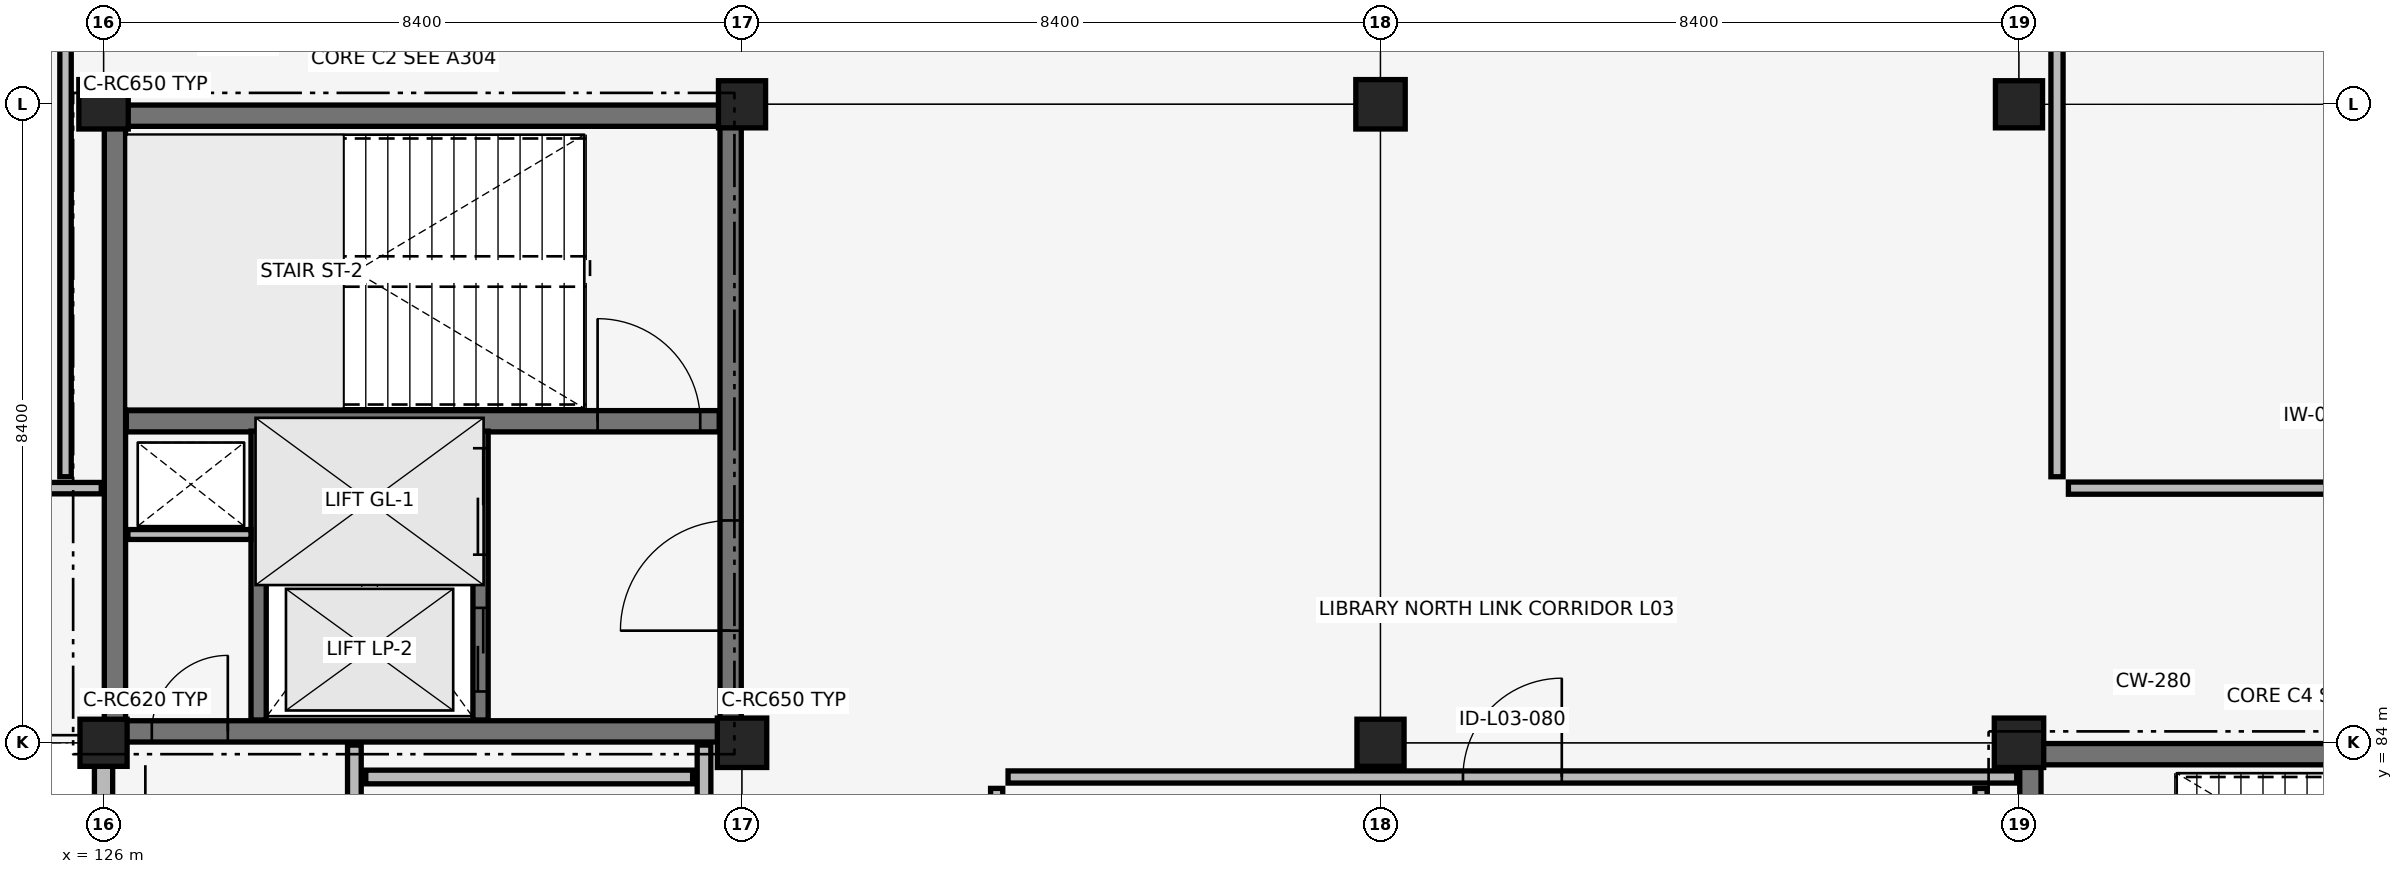
"""IFC4 building model, lengths in metres.
Left out: names, types, materials, properties, quantities, classifications, styles, units other than length and angle.
Written with IfcOpenShell. Run it as: python <this file> out.ifc"""

import sys

from ifc_helpers import new_model, si_unit, direction, frame, frame_2d, origin, origin_2d, place, context, subcontext, project, spatial, rectangle, extrude, element, fill, save


model = new_model("IFC4")
c1 = context("Model", 3, precision=1e-05, world=origin(), true_north=direction((0.0, 1.0)))
c2 = subcontext(c1, "Body", "Model", "MODEL_VIEW")
j1 = project(units=[si_unit("LENGTHUNIT", "METRE"), si_unit("PLANEANGLEUNIT", "RADIAN")], contexts=[c1])
p1 = place(None, origin())
s1 = spatial("IfcSite", under=j1, at=p1, CompositionType="ELEMENT")
p2 = place(p1, origin())
s2 = spatial("IfcBuilding", under=s1, at=p2, CompositionType="ELEMENT")
p3 = place(p2, frame((0.0, 0.0, 13.94)))
s3 = spatial("IfcBuildingStorey", under=s2, at=p3, CompositionType="ELEMENT", Elevation=13.94)
p4 = place(p3, frame((126.15, 84.15, 0.0), z_axis=(0.0, 0.0, 1.0), x_axis=(1.0, 0.0, 0.0)))
e1 = element("IfcWall", 1, at=p4, inside=s3, PredefinedType="SHEAR", context=c2, shape_type="SweptSolid", body=[
    extrude(rectangle(XDim=8.1, YDim=0.28, at=frame_2d((4.05, 0.0))), origin(), (0.0, 0.0, 1.0), 3.78),
])
p5 = place(p4, frame((0.485, 0.0, 0.0)))
e2 = element("IfcOpeningElement", 2, at=p5, cuts=e1, PredefinedType="OPENING", context=c2, shape_type="SweptSolid", body=[
    extrude(rectangle(XDim=1.0, YDim=2.15, at=frame_2d((0.5, 1.075))), frame((0.0, 0.15, 0.0), z_axis=(0.0, -1.0, 0.0), x_axis=(1.0, 0.0, 0.0)), (0.0, 0.0, 1.0), 0.3),
])
for number, where, z_axis, x_axis in (
    (3, (126.15, 92.25, 0.0), (0.0, 0.0, 1.0), (1.0, 0.0, 0.0)),
    (4, (126.15, 84.15, 0.0), (0.0, 0.0, 1.0), (0.0, 1.0, 0.0)),
):
    element("IfcWall", number, at=place(p3, frame(where, z_axis=z_axis, x_axis=x_axis)), inside=s3, PredefinedType="SHEAR", context=c2, shape_type="SweptSolid", body=[
        extrude(rectangle(XDim=8.1, YDim=0.28, at=frame_2d((4.05, 0.0))), origin(), (0.0, 0.0, 1.0), 3.78),
    ])
p6 = place(p3, frame((134.25, 84.15, 0.0), z_axis=(0.0, 0.0, 1.0), x_axis=(0.0, 1.0, 0.0)))
e5 = element("IfcWall", 5, at=p6, inside=s3, PredefinedType="SHEAR", context=c2, shape_type="SweptSolid", body=[
    extrude(rectangle(XDim=8.1, YDim=0.28, at=frame_2d((4.05, 0.0))), origin(), (0.0, 0.0, 1.0), 3.78),
])
p7 = place(p6, frame((1.325, 0.0, 0.0)))
e6 = element("IfcOpeningElement", 6, at=p7, cuts=e5, PredefinedType="OPENING", context=c2, shape_type="SweptSolid", body=[
    extrude(rectangle(XDim=1.45, YDim=2.15, at=frame_2d((0.725, 1.075))), frame((0.0, 0.15, 0.0), z_axis=(0.0, -1.0, 0.0), x_axis=(1.0, 0.0, 0.0)), (0.0, 0.0, 1.0), 0.3),
])
p8 = place(p3, frame((126.3, 88.23, 0.0), z_axis=(0.0, 0.0, 1.0), x_axis=(1.0, 0.0, 0.0)))
e7 = element("IfcWall", 7, at=p8, inside=s3, PredefinedType="SHEAR", context=c2, shape_type="SweptSolid", body=[
    extrude(rectangle(XDim=7.8, YDim=0.28, at=frame_2d((3.9, 0.0))), origin(), (0.0, 0.0, 1.0), 3.78),
])
p9 = place(p8, frame((6.2, 0.0, 0.0)))
e8 = element("IfcOpeningElement", 8, at=p9, cuts=e7, PredefinedType="OPENING", context=c2, shape_type="SweptSolid", body=[
    extrude(rectangle(XDim=1.35, YDim=2.15, at=frame_2d((0.675, 1.075))), frame((0.0, 0.15, 0.0), z_axis=(0.0, -1.0, 0.0), x_axis=(1.0, 0.0, 0.0)), (0.0, 0.0, 1.0), 0.3),
])
p10 = place(p3, frame((151.35, 83.85, 0.0), z_axis=(0.0, 0.0, 1.0), x_axis=(1.0, 0.0, 0.0)))
e9 = element("IfcWall", 9, at=p10, inside=s3, PredefinedType="SHEAR", context=c2, shape_type="SweptSolid", body=[
    extrude(rectangle(XDim=8.1, YDim=0.28, at=frame_2d((4.05, 0.0))), origin(), (0.0, 0.0, 1.0), 3.78),
])
p11 = place(p3, frame((151.35, 75.75, 0.0), z_axis=(0.0, 0.0, 1.0), x_axis=(0.0, 1.0, 0.0)))
e10 = element("IfcWall", 10, at=p11, inside=s3, PredefinedType="SHEAR", context=c2, shape_type="SweptSolid", body=[
    extrude(rectangle(XDim=8.1, YDim=0.28, at=frame_2d((4.05, 0.0))), origin(), (0.0, 0.0, 1.0), 3.78),
])
p12 = place(p11, frame((1.325, 0.0, 0.0)))
e11 = element("IfcOpeningElement", 11, at=p12, cuts=e10, PredefinedType="OPENING", context=c2, shape_type="SweptSolid", body=[
    extrude(rectangle(XDim=1.45, YDim=2.15, at=frame_2d((0.725, 1.075))), frame((0.0, 0.15, 0.0), z_axis=(0.0, -1.0, 0.0), x_axis=(1.0, 0.0, 0.0)), (0.0, 0.0, 1.0), 0.3),
])
p13 = place(p3, frame((126.0, 84.0, 0.0), z_axis=(0.0, 0.0, 1.0), x_axis=(1.0, 0.0, 0.0)))
e12 = element("IfcColumn", 12, at=p13, inside=s3, PredefinedType="COLUMN", context=c2, shape_type="SweptSolid", body=[
    extrude(rectangle(XDim=0.62, YDim=0.62, at=origin_2d()), origin(), (0.0, 0.0, 1.0), 3.78),
])
for number, where, z_axis, x_axis in (
    (13, (126.0, 92.4, 0.0), (0.0, 0.0, 1.0), (1.0, 0.0, 0.0)),
    (14, (134.4, 84.0, 0.0), (0.0, 0.0, 1.0), (1.0, 0.0, 0.0)),
):
    element("IfcColumn", number, at=place(p3, frame(where, z_axis=z_axis, x_axis=x_axis)), inside=s3, PredefinedType="COLUMN", context=c2, shape_type="SweptSolid", body=[
        extrude(rectangle(XDim=0.65, YDim=0.65, at=origin_2d()), origin(), (0.0, 0.0, 1.0), 3.78),
    ])
for number, where, z_axis, x_axis in (
    (15, (134.4, 92.4, 0.0), (0.0, 0.0, 1.0), (1.0, 0.0, 0.0)),
    (16, (142.8, 84.0, 0.0), (0.0, 0.0, 1.0), (1.0, 0.0, 0.0)),
):
    element("IfcColumn", number, at=place(p3, frame(where, z_axis=z_axis, x_axis=x_axis)), inside=s3, PredefinedType="COLUMN", context=c2, shape_type="SweptSolid", body=[
        extrude(rectangle(XDim=0.62, YDim=0.62, at=origin_2d()), origin(), (0.0, 0.0, 1.0), 3.78),
    ])
for number, where, z_axis, x_axis in (
    (17, (142.8, 92.4, 0.0), (0.0, 0.0, 1.0), (1.0, 0.0, 0.0)),
    (18, (151.2, 84.0, 0.0), (0.0, 0.0, 1.0), (1.0, 0.0, 0.0)),
):
    element("IfcColumn", number, at=place(p3, frame(where, z_axis=z_axis, x_axis=x_axis)), inside=s3, PredefinedType="COLUMN", context=c2, shape_type="SweptSolid", body=[
        extrude(rectangle(XDim=0.65, YDim=0.65, at=origin_2d()), origin(), (0.0, 0.0, 1.0), 3.78),
    ])
p14 = place(p3, frame((151.2, 92.4, 0.0), z_axis=(0.0, 0.0, 1.0), x_axis=(1.0, 0.0, 0.0)))
e19 = element("IfcColumn", 19, at=p14, inside=s3, PredefinedType="COLUMN", context=c2, shape_type="SweptSolid", body=[
    extrude(rectangle(XDim=0.62, YDim=0.62, at=origin_2d()), origin(), (0.0, 0.0, 1.0), 3.78),
])
p15 = place(p3, frame((126.0, 75.91, 0.0), z_axis=(0.0, 0.0, 1.0), x_axis=(0.0, 1.0, 0.0)))
e20 = element("IfcWall", 20, at=p15, inside=s3, PredefinedType="SOLIDWALL", context=c2, shape_type="SweptSolid", body=[
    extrude(rectangle(XDim=7.795, YDim=0.24, at=frame_2d((3.897, 0.0))), origin(), (0.0, 0.0, 1.0), 3.15),
])
p16 = place(p15, frame((0.8, 0.0, 0.35)))
e21 = element("IfcOpeningElement", 21, at=p16, cuts=e20, PredefinedType="OPENING", context=c2, shape_type="SweptSolid", body=[
    extrude(rectangle(XDim=0.44, YDim=1.25, at=frame_2d((0.22, 0.625))), frame((0.0, 0.13, 0.0), z_axis=(0.0, -1.0, 0.0), x_axis=(1.0, 0.0, 0.0)), (0.0, 0.0, 1.0), 0.26),
])
p17 = place(p15, frame((2.239, 0.0, 0.35)))
e22 = element("IfcOpeningElement", 22, at=p17, cuts=e20, PredefinedType="OPENING", context=c2, shape_type="SweptSolid", body=[
    extrude(rectangle(XDim=0.44, YDim=1.25, at=frame_2d((0.22, 0.625))), frame((0.0, 0.13, 0.0), z_axis=(0.0, -1.0, 0.0), x_axis=(1.0, 0.0, 0.0)), (0.0, 0.0, 1.0), 0.26),
])
p18 = place(p15, frame((3.677, 0.0, 0.35)))
e23 = element("IfcOpeningElement", 23, at=p18, cuts=e20, PredefinedType="OPENING", context=c2, shape_type="SweptSolid", body=[
    extrude(rectangle(XDim=0.44, YDim=1.25, at=frame_2d((0.22, 0.625))), frame((0.0, 0.13, 0.0), z_axis=(0.0, -1.0, 0.0), x_axis=(1.0, 0.0, 0.0)), (0.0, 0.0, 1.0), 0.26),
])
p19 = place(p15, frame((5.116, 0.0, 0.35)))
e24 = element("IfcOpeningElement", 24, at=p19, cuts=e20, PredefinedType="OPENING", context=c2, shape_type="SweptSolid", body=[
    extrude(rectangle(XDim=0.44, YDim=1.25, at=frame_2d((0.22, 0.625))), frame((0.0, 0.13, 0.0), z_axis=(0.0, -1.0, 0.0), x_axis=(1.0, 0.0, 0.0)), (0.0, 0.0, 1.0), 0.26),
])
p20 = place(p15, frame((6.555, 0.0, 0.35)))
e25 = element("IfcOpeningElement", 25, at=p20, cuts=e20, PredefinedType="OPENING", context=c2, shape_type="SweptSolid", body=[
    extrude(rectangle(XDim=0.44, YDim=1.25, at=frame_2d((0.22, 0.625))), frame((0.0, 0.13, 0.0), z_axis=(0.0, -1.0, 0.0), x_axis=(1.0, 0.0, 0.0)), (0.0, 0.0, 1.0), 0.26),
])
p21 = place(p3, frame((130.96, 84.3, 0.0), z_axis=(0.0, 0.0, 1.0), x_axis=(0.0, 1.0, 0.0)))
e26 = element("IfcWall", 26, at=p21, inside=s3, PredefinedType="SHEAR", context=c2, shape_type="SweptSolid", body=[
    extrude(rectangle(XDim=3.8, YDim=0.2, at=frame_2d((1.9, 0.0))), origin(), (0.0, 0.0, 1.0), 3.05),
])
p22 = place(p21, frame((0.375, 0.0, 0.0)))
e27 = element("IfcOpeningElement", 27, at=p22, cuts=e26, PredefinedType="OPENING", context=c2, shape_type="SweptSolid", body=[
    extrude(rectangle(XDim=1.1, YDim=2.15, at=frame_2d((0.55, 1.075))), frame((0.0, 0.11, 0.0), z_axis=(0.0, -1.0, 0.0), x_axis=(1.0, 0.0, 0.0)), (0.0, 0.0, 1.0), 0.22),
])
p23 = place(p21, frame((2.175, 0.0, 0.0)))
e28 = element("IfcOpeningElement", 28, at=p23, cuts=e26, PredefinedType="OPENING", context=c2, shape_type="SweptSolid", body=[
    extrude(rectangle(XDim=1.4, YDim=2.2, at=frame_2d((0.7, 1.1))), frame((0.0, 0.11, 0.0), z_axis=(0.0, -1.0, 0.0), x_axis=(1.0, 0.0, 0.0)), (0.0, 0.0, 1.0), 0.22),
])
p24 = place(p3, frame((128.04, 84.3, 0.0), z_axis=(0.0, 0.0, 1.0), x_axis=(0.0, 1.0, 0.0)))
e29 = element("IfcWall", 29, at=p24, inside=s3, PredefinedType="SHEAR", context=c2, shape_type="SweptSolid", body=[
    extrude(rectangle(XDim=3.8, YDim=0.2, at=frame_2d((1.9, 0.0))), origin(), (0.0, 0.0, 1.0), 3.05),
])
p25 = place(p3, frame((128.15, 86.2, 0.0), z_axis=(0.0, 0.0, 1.0), x_axis=(1.0, 0.0, 0.0)))
e30 = element("IfcWall", 30, at=p25, inside=s3, PredefinedType="SHEAR", context=c2, shape_type="SweptSolid", body=[
    extrude(rectangle(XDim=2.7, YDim=0.18, at=frame_2d((1.35, 0.0))), origin(), (0.0, 0.0, 1.0), 3.78),
])
p26 = place(p3, frame((126.32, 86.74, 0.0), z_axis=(0.0, 0.0, 1.0), x_axis=(1.0, 0.0, 0.0)))
e31 = element("IfcWall", 31, at=p26, inside=s3, PredefinedType="PARTITIONING", context=c2, shape_type="SweptSolid", body=[
    extrude(rectangle(XDim=1.62, YDim=0.13, at=frame_2d((0.81, 0.0))), origin(), (0.0, 0.0, 1.0), 3.78),
])
p27 = place(p3, frame((129.45, 83.55, 0.0), z_axis=(0.0, 0.0, 1.0), x_axis=(1.0, 0.0, 0.0)))
e32 = element("IfcWall", 32, at=p27, inside=s3, PredefinedType="PARTITIONING", context=c2, shape_type="SweptSolid", body=[
    extrude(rectangle(XDim=4.3, YDim=0.18, at=frame_2d((2.15, 0.0))), origin(), (0.0, 0.0, 1.0), 3.78),
])
for number, where, z_axis, x_axis in (
    (33, (129.3, 36.7, 0.0), (0.0, 0.0, 1.0), (0.0, 1.0, 0.0)),
    (34, (133.9, 36.7, 0.0), (0.0, 0.0, 1.0), (0.0, 1.0, 0.0)),
):
    element("IfcWall", number, at=place(p3, frame(where, z_axis=z_axis, x_axis=x_axis)), inside=s3, PredefinedType="PARTITIONING", context=c2, shape_type="SweptSolid", body=[
        extrude(rectangle(XDim=47.27, YDim=0.18, at=frame_2d((23.635, 0.0))), origin(), (0.0, 0.0, 1.0), 3.05),
    ])
p28 = place(p3, frame((151.85, 87.35, 0.0), z_axis=(0.0, 0.0, 1.0), x_axis=(1.0, 0.0, 0.0)))
e35 = element("IfcWall", 35, at=p28, inside=s3, PredefinedType="PARTITIONING", context=c2, shape_type="SweptSolid", body=[
    extrude(rectangle(XDim=15.97, YDim=0.16, at=frame_2d((7.985, 0.0))), origin(), (0.0, 0.0, 1.0), 3.15),
])
p29 = place(p28, frame((7.335, 0.0, 0.0)))
e36 = element("IfcOpeningElement", 36, at=p29, cuts=e35, PredefinedType="OPENING", context=c2, shape_type="SweptSolid", body=[
    extrude(rectangle(XDim=1.3, YDim=2.2, at=frame_2d((0.65, 1.1))), frame((0.0, 0.09, 0.0), z_axis=(0.0, -1.0, 0.0), x_axis=(1.0, 0.0, 0.0)), (0.0, 0.0, 1.0), 0.18),
])
p30 = place(p3, frame((151.7, 87.5, 0.0), z_axis=(0.0, 0.0, 1.0), x_axis=(0.0, 1.0, 0.0)))
e37 = element("IfcWall", 37, at=p30, inside=s3, PredefinedType="PARTITIONING", context=c2, shape_type="SweptSolid", body=[
    extrude(rectangle(XDim=29.82, YDim=0.16, at=frame_2d((14.91, 0.0))), origin(), (0.0, 0.0, 1.0), 3.05),
])
p31 = place(p3, frame((109.23, 87.35, 0.0), z_axis=(0.0, 0.0, 1.0), x_axis=(1.0, 0.0, 0.0)))
e38 = element("IfcWall", 38, at=p31, inside=s3, PredefinedType="PARTITIONING", context=c2, shape_type="SweptSolid", body=[
    extrude(rectangle(XDim=16.74, YDim=0.15, at=frame_2d((8.37, 0.0))), origin(), (0.0, 0.0, 1.0), 3.1),
])
p32 = place(p31, frame((7.845, 0.0, 0.0)))
e39 = element("IfcOpeningElement", 39, at=p32, cuts=e38, PredefinedType="OPENING", context=c2, shape_type="SweptSolid", body=[
    extrude(rectangle(XDim=1.05, YDim=2.15, at=frame_2d((0.525, 1.075))), frame((0.0, 0.085, 0.0), z_axis=(0.0, -1.0, 0.0), x_axis=(1.0, 0.0, 0.0)), (0.0, 0.0, 1.0), 0.17),
])
p33 = place(p3, frame((125.5, 87.5, 0.0), z_axis=(0.0, 0.0, 1.0), x_axis=(0.0, 1.0, 0.0)))
e40 = element("IfcWall", 40, at=p33, inside=s3, PredefinedType="PARTITIONING", context=c2, shape_type="SweptSolid", body=[
    extrude(rectangle(XDim=29.82, YDim=0.15, at=frame_2d((14.91, 0.0))), origin(), (0.0, 0.0, 1.0), 3.05),
])
p34 = place(p3, frame((137.9, 83.55, 0.0), z_axis=(0.0, 0.0, 1.0), x_axis=(1.0, 0.0, 0.0)))
e41 = element("IfcWall", 41, at=p34, inside=s3, PredefinedType="PARTITIONING", context=c2, shape_type="SweptSolid", body=[
    extrude(rectangle(XDim=13.27, YDim=0.16, at=frame_2d((6.635, 0.0))), origin(), (0.0, 0.0, 1.0), 3.1),
])
p35 = place(p34, frame((5.985, 0.0, 0.0)))
e42 = element("IfcOpeningElement", 42, at=p35, cuts=e41, PredefinedType="OPENING", context=c2, shape_type="SweptSolid", body=[
    extrude(rectangle(XDim=1.3, YDim=2.2, at=frame_2d((0.65, 1.1))), frame((0.0, 0.09, 0.0), z_axis=(0.0, -1.0, 0.0), x_axis=(1.0, 0.0, 0.0)), (0.0, 0.0, 1.0), 0.18),
])
for number, where, z_axis, x_axis in (
    (43, (137.75, 67.8, 0.0), (0.0, 0.0, 1.0), (0.0, 1.0, 0.0)),
    (44, (150.7, 67.8, 0.0), (0.0, 0.0, 1.0), (0.0, 1.0, 0.0)),
):
    element("IfcWall", number, at=place(p3, frame(where, z_axis=z_axis, x_axis=x_axis)), inside=s3, PredefinedType="PARTITIONING", context=c2, shape_type="SweptSolid", body=[
        extrude(rectangle(XDim=15.6, YDim=0.16, at=frame_2d((7.8, 0.0))), origin(), (0.0, 0.0, 1.0), 3.13),
    ])
p36 = place(p9, origin())
e45 = element("IfcDoor", 45, at=p36, inside=s3, OperationType="SINGLE_SWING_LEFT", PredefinedType="DOOR", context=c2, shape_type="SweptSolid", body=[
    extrude(rectangle(XDim=1.35, YDim=2.15, at=frame_2d((0.675, 1.075))), frame((0.0, 0.025, 0.0), z_axis=(0.0, -1.0, 0.0), x_axis=(1.0, 0.0, 0.0)), (0.0, 0.0, 1.0), 0.05),
])
fill(e8, e45)
p37 = place(p22, origin())
e46 = element("IfcDoor", 46, at=p37, inside=s3, OperationType="SLIDING_TO_LEFT", PredefinedType="DOOR", context=c2, shape_type="SweptSolid", body=[
    extrude(rectangle(XDim=1.1, YDim=2.15, at=frame_2d((0.55, 1.075))), frame((0.0, 0.025, 0.0), z_axis=(0.0, -1.0, 0.0), x_axis=(1.0, 0.0, 0.0)), (0.0, 0.0, 1.0), 0.05),
])
fill(e27, e46)
p38 = place(p23, origin())
e47 = element("IfcDoor", 47, at=p38, inside=s3, OperationType="SLIDING_TO_LEFT", PredefinedType="DOOR", context=c2, shape_type="SweptSolid", body=[
    extrude(rectangle(XDim=1.4, YDim=2.2, at=frame_2d((0.7, 1.1))), frame((0.0, 0.025, 0.0), z_axis=(0.0, -1.0, 0.0), x_axis=(1.0, 0.0, 0.0)), (0.0, 0.0, 1.0), 0.05),
])
fill(e28, e47)
p39 = place(p7, origin())
e48 = element("IfcDoor", 48, at=p39, inside=s3, OperationType="DOUBLE_DOOR_SINGLE_SWING", PredefinedType="DOOR", context=c2, shape_type="SweptSolid", body=[
    extrude(rectangle(XDim=1.45, YDim=2.15, at=frame_2d((0.725, 1.075))), frame((0.0, 0.025, 0.0), z_axis=(0.0, -1.0, 0.0), x_axis=(1.0, 0.0, 0.0)), (0.0, 0.0, 1.0), 0.05),
])
fill(e6, e48)
p40 = place(p5, origin())
e49 = element("IfcDoor", 49, at=p40, inside=s3, OperationType="SINGLE_SWING_RIGHT", PredefinedType="DOOR", context=c2, shape_type="SweptSolid", body=[
    extrude(rectangle(XDim=1.0, YDim=2.15, at=frame_2d((0.5, 1.075))), frame((0.0, 0.025, 0.0), z_axis=(0.0, -1.0, 0.0), x_axis=(1.0, 0.0, 0.0)), (0.0, 0.0, 1.0), 0.05),
])
fill(e2, e49)
p41 = place(p35, origin())
e50 = element("IfcDoor", 50, at=p41, inside=s3, OperationType="SINGLE_SWING_RIGHT", PredefinedType="DOOR", context=c2, shape_type="SweptSolid", body=[
    extrude(rectangle(XDim=1.3, YDim=2.2, at=frame_2d((0.65, 1.1))), frame((0.0, 0.025, 0.0), z_axis=(0.0, -1.0, 0.0), x_axis=(1.0, 0.0, 0.0)), (0.0, 0.0, 1.0), 0.05),
])
fill(e42, e50)
save(model, sys.argv[1])
